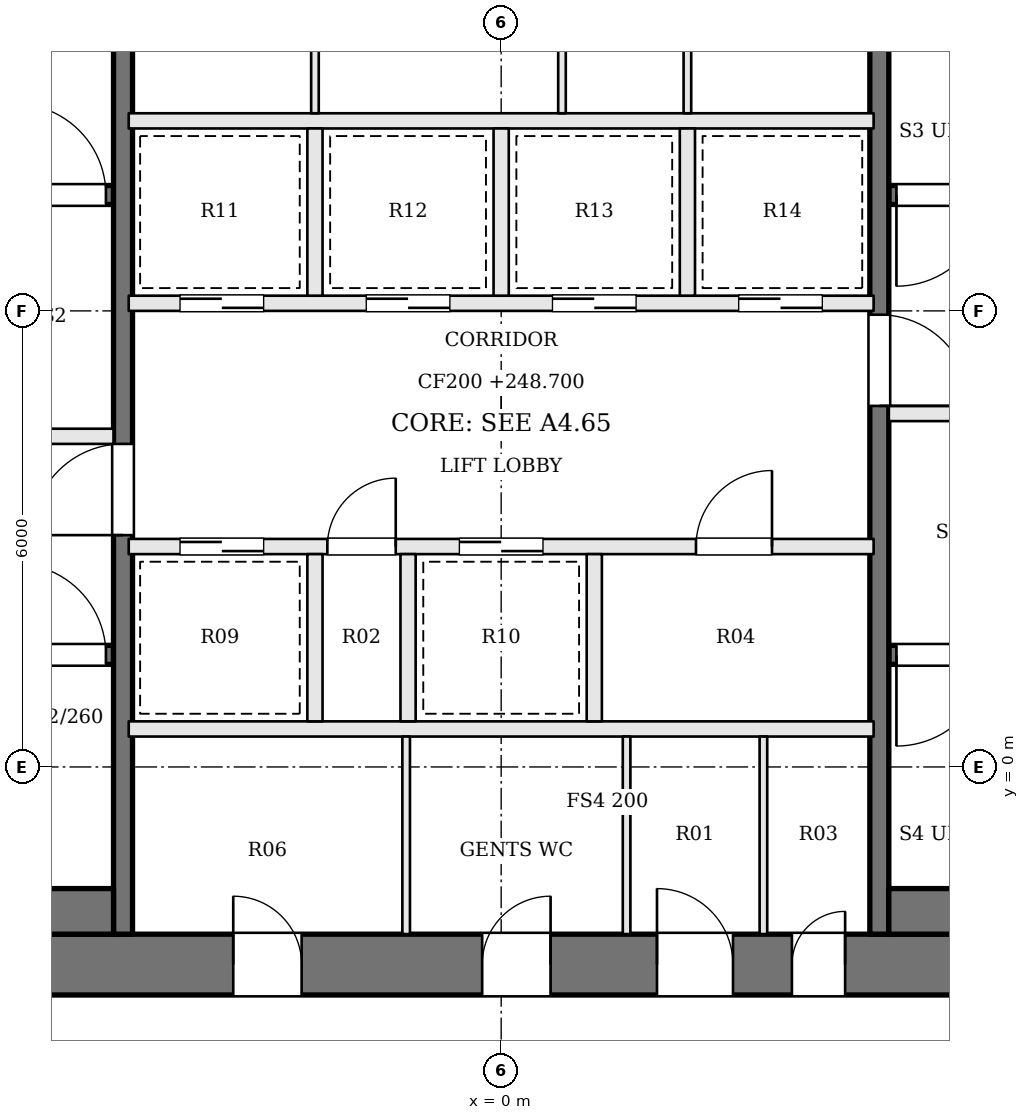
"""IFC4 building model, lengths in metres.
Left out: names, types, materials, properties, quantities, classifications, styles, units other than length and angle.
Written with IfcOpenShell. Run it as: python <this file> out.ifc"""

import sys

from ifc_helpers import new_model, si_unit, direction, frame, frame_2d, origin, place, context, subcontext, project, spatial, rectangle, extrude, element, fill, save


model = new_model("IFC4")
c1 = context("Model", 3, precision=1e-05, world=origin(), true_north=direction((0.0, 1.0)))
c2 = subcontext(c1, "Body", "Model", "MODEL_VIEW")
j1 = project(units=[si_unit("LENGTHUNIT", "METRE"), si_unit("PLANEANGLEUNIT", "RADIAN")], contexts=[c1])
p1 = place(None, origin())
s1 = spatial("IfcSite", under=j1, at=p1, CompositionType="ELEMENT")
p2 = place(p1, origin())
s2 = spatial("IfcBuilding", under=s1, at=p2, CompositionType="ELEMENT")
p3 = place(p2, frame((0.0, 0.0, 248.7)))
s3 = spatial("IfcBuildingStorey", under=s2, at=p3, CompositionType="ELEMENT", Elevation=248.7)
p4 = place(p3, frame((-13.0, -2.6, 0.0), z_axis=(0.0, 0.0, 1.0), x_axis=(1.0, 0.0, 0.0)))
e1 = element("IfcWall", 1, at=p4, inside=s3, PredefinedType="SHEAR", context=c2, shape_type="SweptSolid", body=[
    extrude(rectangle(XDim=26.0, YDim=0.8, at=frame_2d((13.0, 0.0))), origin(), (0.0, 0.0, 1.0), 3.9),
])
p5 = place(p4, frame((9.475, 0.0, 0.0)))
e2 = element("IfcOpeningElement", 2, at=p5, cuts=e1, PredefinedType="OPENING", context=c2, shape_type="SweptSolid", body=[
    extrude(rectangle(XDim=0.9, YDim=2.1, at=frame_2d((0.45, 1.05))), frame((0.0, 0.41, 0.0), z_axis=(0.0, -1.0, 0.0), x_axis=(1.0, 0.0, 0.0)), (0.0, 0.0, 1.0), 0.82),
])
p6 = place(p4, frame((12.75, 0.0, 0.0)))
e3 = element("IfcOpeningElement", 3, at=p6, cuts=e1, PredefinedType="OPENING", context=c2, shape_type="SweptSolid", body=[
    extrude(rectangle(XDim=0.9, YDim=2.1, at=frame_2d((0.45, 1.05))), frame((0.0, 0.41, 0.0), z_axis=(0.0, -1.0, 0.0), x_axis=(1.0, 0.0, 0.0)), (0.0, 0.0, 1.0), 0.82),
])
p7 = place(p4, frame((15.05, 0.0, 0.0)))
e4 = element("IfcOpeningElement", 4, at=p7, cuts=e1, PredefinedType="OPENING", context=c2, shape_type="SweptSolid", body=[
    extrude(rectangle(XDim=1.0, YDim=2.1, at=frame_2d((0.5, 1.05))), frame((0.0, 0.41, 0.0), z_axis=(0.0, -1.0, 0.0), x_axis=(1.0, 0.0, 0.0)), (0.0, 0.0, 1.0), 0.82),
])
p8 = place(p4, frame((16.825, 0.0, 0.0)))
e5 = element("IfcOpeningElement", 5, at=p8, cuts=e1, PredefinedType="OPENING", context=c2, shape_type="SweptSolid", body=[
    extrude(rectangle(XDim=0.7, YDim=2.1, at=frame_2d((0.35, 1.05))), frame((0.0, 0.41, 0.0), z_axis=(0.0, -1.0, 0.0), x_axis=(1.0, 0.0, 0.0)), (0.0, 0.0, 1.0), 0.82),
])
p9 = place(p3, frame((-12.2, 1.475, 0.0), z_axis=(0.0, 0.0, 1.0), x_axis=(1.0, 0.0, 0.0)))
e6 = element("IfcWall", 6, at=p9, inside=s3, PredefinedType="SOLIDWALL", context=c2, shape_type="SweptSolid", body=[
    extrude(rectangle(XDim=7.1, YDim=0.25, at=frame_2d((3.55, 0.0))), origin(), (0.0, 0.0, 1.0), 3.7),
])
p10 = place(p9, frame((5.8, 0.0, 0.0)))
e7 = element("IfcOpeningElement", 7, at=p10, cuts=e6, PredefinedType="OPENING", context=c2, shape_type="SweptSolid", body=[
    extrude(rectangle(XDim=1.2, YDim=2.1, at=frame_2d((0.6, 1.05))), frame((0.0, 0.135, 0.0), z_axis=(0.0, -1.0, 0.0), x_axis=(1.0, 0.0, 0.0)), (0.0, 0.0, 1.0), 0.27),
])
p11 = place(p3, frame((12.2, 7.525, 0.0), z_axis=(0.0, 0.0, 1.0), x_axis=(-1.0, 0.0, 0.0)))
e8 = element("IfcWall", 8, at=p11, inside=s3, PredefinedType="SOLIDWALL", context=c2, shape_type="SweptSolid", body=[
    extrude(rectangle(XDim=7.1, YDim=0.25, at=frame_2d((3.55, 0.0))), origin(), (0.0, 0.0, 1.0), 3.7),
])
p12 = place(p11, frame((5.8, 0.0, 0.0)))
e9 = element("IfcOpeningElement", 9, at=p12, cuts=e8, PredefinedType="OPENING", context=c2, shape_type="SweptSolid", body=[
    extrude(rectangle(XDim=1.2, YDim=2.1, at=frame_2d((0.6, 1.05))), frame((0.0, 0.135, 0.0), z_axis=(0.0, -1.0, 0.0), x_axis=(1.0, 0.0, 0.0)), (0.0, 0.0, 1.0), 0.27),
])
p13 = place(p3, frame((-12.2, 4.35, 0.0), z_axis=(0.0, 0.0, 1.0), x_axis=(1.0, 0.0, 0.0)))
e10 = element("IfcWall", 10, at=p13, inside=s3, PredefinedType="SOLIDWALL", context=c2, shape_type="SweptSolid", body=[
    extrude(rectangle(XDim=7.1, YDim=0.2, at=frame_2d((3.55, 0.0))), origin(), (0.0, 0.0, 1.0), 3.7),
])
p14 = place(p13, frame((4.4, 0.0, 0.0)))
e11 = element("IfcOpeningElement", 11, at=p14, cuts=e10, PredefinedType="OPENING", context=c2, shape_type="SweptSolid", body=[
    extrude(rectangle(XDim=1.2, YDim=2.1, at=frame_2d((0.6, 1.05))), frame((0.0, 0.11, 0.0), z_axis=(0.0, -1.0, 0.0), x_axis=(1.0, 0.0, 0.0)), (0.0, 0.0, 1.0), 0.22),
])
p15 = place(p13, frame((1.1, 0.0, 0.0)))
e12 = element("IfcOpeningElement", 12, at=p15, cuts=e10, PredefinedType="OPENING", context=c2, shape_type="SweptSolid", body=[
    extrude(rectangle(XDim=1.2, YDim=2.1, at=frame_2d((0.6, 1.05))), frame((0.0, 0.11, 0.0), z_axis=(0.0, -1.0, 0.0), x_axis=(1.0, 0.0, 0.0)), (0.0, 0.0, 1.0), 0.22),
])
p16 = place(p3, frame((12.2, 4.65, 0.0), z_axis=(0.0, 0.0, 1.0), x_axis=(-1.0, 0.0, 0.0)))
e13 = element("IfcWall", 13, at=p16, inside=s3, PredefinedType="SOLIDWALL", context=c2, shape_type="SweptSolid", body=[
    extrude(rectangle(XDim=7.1, YDim=0.2, at=frame_2d((3.55, 0.0))), origin(), (0.0, 0.0, 1.0), 3.7),
])
p17 = place(p16, frame((4.4, 0.0, 0.0)))
e14 = element("IfcOpeningElement", 14, at=p17, cuts=e13, PredefinedType="OPENING", context=c2, shape_type="SweptSolid", body=[
    extrude(rectangle(XDim=1.2, YDim=2.1, at=frame_2d((0.6, 1.05))), frame((0.0, 0.11, 0.0), z_axis=(0.0, -1.0, 0.0), x_axis=(1.0, 0.0, 0.0)), (0.0, 0.0, 1.0), 0.22),
])
p18 = place(p16, frame((1.1, 0.0, 0.0)))
e15 = element("IfcOpeningElement", 15, at=p18, cuts=e13, PredefinedType="OPENING", context=c2, shape_type="SweptSolid", body=[
    extrude(rectangle(XDim=1.2, YDim=2.1, at=frame_2d((0.6, 1.05))), frame((0.0, 0.11, 0.0), z_axis=(0.0, -1.0, 0.0), x_axis=(1.0, 0.0, 0.0)), (0.0, 0.0, 1.0), 0.22),
])
p19 = place(p3, frame((-12.2, 7.525, 0.0), z_axis=(0.0, 0.0, 1.0), x_axis=(1.0, 0.0, 0.0)))
e16 = element("IfcWall", 16, at=p19, inside=s3, PredefinedType="SOLIDWALL", context=c2, shape_type="SweptSolid", body=[
    extrude(rectangle(XDim=7.1, YDim=0.25, at=frame_2d((3.55, 0.0))), origin(), (0.0, 0.0, 1.0), 3.7),
])
p20 = place(p19, frame((5.8, 0.0, 0.0)))
e17 = element("IfcOpeningElement", 17, at=p20, cuts=e16, PredefinedType="OPENING", context=c2, shape_type="SweptSolid", body=[
    extrude(rectangle(XDim=1.2, YDim=2.1, at=frame_2d((0.6, 1.05))), frame((0.0, 0.135, 0.0), z_axis=(0.0, -1.0, 0.0), x_axis=(1.0, 0.0, 0.0)), (0.0, 0.0, 1.0), 0.27),
])
p21 = place(p3, frame((12.2, 1.475, 0.0), z_axis=(0.0, 0.0, 1.0), x_axis=(-1.0, 0.0, 0.0)))
e18 = element("IfcWall", 18, at=p21, inside=s3, PredefinedType="SOLIDWALL", context=c2, shape_type="SweptSolid", body=[
    extrude(rectangle(XDim=7.1, YDim=0.25, at=frame_2d((3.55, 0.0))), origin(), (0.0, 0.0, 1.0), 3.7),
])
p22 = place(p21, frame((5.8, 0.0, 0.0)))
e19 = element("IfcOpeningElement", 19, at=p22, cuts=e18, PredefinedType="OPENING", context=c2, shape_type="SweptSolid", body=[
    extrude(rectangle(XDim=1.2, YDim=2.1, at=frame_2d((0.6, 1.05))), frame((0.0, 0.135, 0.0), z_axis=(0.0, -1.0, 0.0), x_axis=(1.0, 0.0, 0.0)), (0.0, 0.0, 1.0), 0.27),
])
p23 = place(p3, frame((-4.975, -2.2, 0.0), z_axis=(0.0, 0.0, 1.0), x_axis=(0.0, 1.0, 0.0)))
e20 = element("IfcWall", 20, at=p23, inside=s3, PredefinedType="SOLIDWALL", context=c2, shape_type="SweptSolid", body=[
    extrude(rectangle(XDim=13.4, YDim=0.25, at=frame_2d((6.7, 0.0))), origin(), (0.0, 0.0, 1.0), 3.7),
])
p24 = place(p23, frame((5.25, 0.0, 0.0)))
e21 = element("IfcOpeningElement", 21, at=p24, cuts=e20, PredefinedType="OPENING", context=c2, shape_type="SweptSolid", body=[
    extrude(rectangle(XDim=1.2, YDim=2.1, at=frame_2d((0.6, 1.05))), frame((0.0, 0.135, 0.0), z_axis=(0.0, -1.0, 0.0), x_axis=(1.0, 0.0, 0.0)), (0.0, 0.0, 1.0), 0.27),
])
p25 = place(p3, frame((4.975, 11.2, 0.0), z_axis=(0.0, 0.0, 1.0), x_axis=(0.0, -1.0, 0.0)))
e22 = element("IfcWall", 22, at=p25, inside=s3, PredefinedType="SOLIDWALL", context=c2, shape_type="SweptSolid", body=[
    extrude(rectangle(XDim=13.4, YDim=0.25, at=frame_2d((6.7, 0.0))), origin(), (0.0, 0.0, 1.0), 3.7),
])
p26 = place(p25, frame((5.25, 0.0, 0.0)))
e23 = element("IfcOpeningElement", 23, at=p26, cuts=e22, PredefinedType="OPENING", context=c2, shape_type="SweptSolid", body=[
    extrude(rectangle(XDim=1.2, YDim=2.1, at=frame_2d((0.6, 1.05))), frame((0.0, 0.135, 0.0), z_axis=(0.0, -1.0, 0.0), x_axis=(1.0, 0.0, 0.0)), (0.0, 0.0, 1.0), 0.27),
])
for number, where, z_axis, x_axis in (
    (24, (-12.2, -1.9, 0.0), (0.0, 0.0, 1.0), (1.0, 0.0, 0.0)),
    (25, (12.2, -1.9, 0.0), (0.0, 0.0, 1.0), (-1.0, 0.0, 0.0)),
):
    element("IfcWall", number, at=place(p3, frame(where, z_axis=z_axis, x_axis=x_axis)), inside=s3, PredefinedType="SOLIDWALL", context=c2, shape_type="SweptSolid", body=[
        extrude(rectangle(XDim=7.1, YDim=0.6, at=frame_2d((3.55, 0.0))), origin(), (0.0, 0.0, 1.0), 3.7),
    ])
p27 = place(p3, frame((-4.9, 0.5, 0.0), z_axis=(0.0, 0.0, 1.0), x_axis=(1.0, 0.0, 0.0)))
e26 = element("IfcWall", 26, at=p27, inside=s3, PredefinedType="SOLIDWALL", context=c2, shape_type="SweptSolid", body=[
    extrude(rectangle(XDim=9.8, YDim=0.2, at=frame_2d((4.9, 0.0))), origin(), (0.0, 0.0, 1.0), 3.7),
])
p28 = place(p3, frame((-4.9, 2.9, 0.0), z_axis=(0.0, 0.0, 1.0), x_axis=(1.0, 0.0, 0.0)))
e27 = element("IfcWall", 27, at=p28, inside=s3, PredefinedType="SOLIDWALL", context=c2, shape_type="SweptSolid", body=[
    extrude(rectangle(XDim=9.8, YDim=0.2, at=frame_2d((4.9, 0.0))), origin(), (0.0, 0.0, 1.0), 3.7),
])
p29 = place(p28, frame((0.675, 0.0, 0.0)))
e28 = element("IfcOpeningElement", 28, at=p29, cuts=e27, PredefinedType="OPENING", context=c2, shape_type="SweptSolid", body=[
    extrude(rectangle(XDim=1.1, YDim=2.1, at=frame_2d((0.55, 1.05))), frame((0.0, 0.11, 0.0), z_axis=(0.0, -1.0, 0.0), x_axis=(1.0, 0.0, 0.0)), (0.0, 0.0, 1.0), 0.22),
])
p30 = place(p28, frame((2.613, 0.0, 0.0)))
e29 = element("IfcOpeningElement", 29, at=p30, cuts=e27, PredefinedType="OPENING", context=c2, shape_type="SweptSolid", body=[
    extrude(rectangle(XDim=0.9, YDim=2.1, at=frame_2d((0.45, 1.05))), frame((0.0, 0.11, 0.0), z_axis=(0.0, -1.0, 0.0), x_axis=(1.0, 0.0, 0.0)), (0.0, 0.0, 1.0), 0.22),
])
p31 = place(p28, frame((4.35, 0.0, 0.0)))
e30 = element("IfcOpeningElement", 30, at=p31, cuts=e27, PredefinedType="OPENING", context=c2, shape_type="SweptSolid", body=[
    extrude(rectangle(XDim=1.1, YDim=2.1, at=frame_2d((0.55, 1.05))), frame((0.0, 0.11, 0.0), z_axis=(0.0, -1.0, 0.0), x_axis=(1.0, 0.0, 0.0)), (0.0, 0.0, 1.0), 0.22),
])
p32 = place(p28, frame((7.463, 0.0, 0.0)))
e31 = element("IfcOpeningElement", 31, at=p32, cuts=e27, PredefinedType="OPENING", context=c2, shape_type="SweptSolid", body=[
    extrude(rectangle(XDim=1.0, YDim=2.1, at=frame_2d((0.5, 1.05))), frame((0.0, 0.11, 0.0), z_axis=(0.0, -1.0, 0.0), x_axis=(1.0, 0.0, 0.0)), (0.0, 0.0, 1.0), 0.22),
])
p33 = place(p3, frame((-4.9, 6.1, 0.0), z_axis=(0.0, 0.0, 1.0), x_axis=(1.0, 0.0, 0.0)))
e32 = element("IfcWall", 32, at=p33, inside=s3, PredefinedType="SOLIDWALL", context=c2, shape_type="SweptSolid", body=[
    extrude(rectangle(XDim=9.8, YDim=0.2, at=frame_2d((4.9, 0.0))), origin(), (0.0, 0.0, 1.0), 3.7),
])
p34 = place(p33, frame((0.675, 0.0, 0.0)))
e33 = element("IfcOpeningElement", 33, at=p34, cuts=e32, PredefinedType="OPENING", context=c2, shape_type="SweptSolid", body=[
    extrude(rectangle(XDim=1.1, YDim=2.1, at=frame_2d((0.55, 1.05))), frame((0.0, 0.11, 0.0), z_axis=(0.0, -1.0, 0.0), x_axis=(1.0, 0.0, 0.0)), (0.0, 0.0, 1.0), 0.22),
])
p35 = place(p33, frame((3.125, 0.0, 0.0)))
e34 = element("IfcOpeningElement", 34, at=p35, cuts=e32, PredefinedType="OPENING", context=c2, shape_type="SweptSolid", body=[
    extrude(rectangle(XDim=1.1, YDim=2.1, at=frame_2d((0.55, 1.05))), frame((0.0, 0.11, 0.0), z_axis=(0.0, -1.0, 0.0), x_axis=(1.0, 0.0, 0.0)), (0.0, 0.0, 1.0), 0.22),
])
p36 = place(p33, frame((5.575, 0.0, 0.0)))
e35 = element("IfcOpeningElement", 35, at=p36, cuts=e32, PredefinedType="OPENING", context=c2, shape_type="SweptSolid", body=[
    extrude(rectangle(XDim=1.1, YDim=2.1, at=frame_2d((0.55, 1.05))), frame((0.0, 0.11, 0.0), z_axis=(0.0, -1.0, 0.0), x_axis=(1.0, 0.0, 0.0)), (0.0, 0.0, 1.0), 0.22),
])
p37 = place(p33, frame((8.025, 0.0, 0.0)))
e36 = element("IfcOpeningElement", 36, at=p37, cuts=e32, PredefinedType="OPENING", context=c2, shape_type="SweptSolid", body=[
    extrude(rectangle(XDim=1.1, YDim=2.1, at=frame_2d((0.55, 1.05))), frame((0.0, 0.11, 0.0), z_axis=(0.0, -1.0, 0.0), x_axis=(1.0, 0.0, 0.0)), (0.0, 0.0, 1.0), 0.22),
])
p38 = place(p3, frame((-4.9, 8.5, 0.0), z_axis=(0.0, 0.0, 1.0), x_axis=(1.0, 0.0, 0.0)))
e37 = element("IfcWall", 37, at=p38, inside=s3, PredefinedType="SOLIDWALL", context=c2, shape_type="SweptSolid", body=[
    extrude(rectangle(XDim=9.8, YDim=0.2, at=frame_2d((4.9, 0.0))), origin(), (0.0, 0.0, 1.0), 3.7),
])
for number, where, z_axis, x_axis in (
    (38, (-2.45, 0.6, 0.0), (0.0, 0.0, 1.0), (0.0, 1.0, 0.0)),
    (39, (-1.225, 0.6, 0.0), (0.0, 0.0, 1.0), (0.0, 1.0, 0.0)),
    (40, (1.225, 0.6, 0.0), (0.0, 0.0, 1.0), (0.0, 1.0, 0.0)),
    (41, (-2.45, 6.2, 0.0), (0.0, 0.0, 1.0), (0.0, 1.0, 0.0)),
    (42, (0.0, 6.2, 0.0), (0.0, 0.0, 1.0), (0.0, 1.0, 0.0)),
    (43, (2.45, 6.2, 0.0), (0.0, 0.0, 1.0), (0.0, 1.0, 0.0)),
):
    element("IfcWall", number, at=place(p3, frame(where, z_axis=z_axis, x_axis=x_axis)), inside=s3, PredefinedType="SOLIDWALL", context=c2, shape_type="SweptSolid", body=[
        extrude(rectangle(XDim=2.2, YDim=0.2, at=frame_2d((1.1, 0.0))), origin(), (0.0, 0.0, 1.0), 3.7),
    ])
for number, where, z_axis, x_axis in (
    (44, (-1.25, -2.2, 0.0), (0.0, 0.0, 1.0), (0.0, 1.0, 0.0)),
    (45, (1.65, -2.2, 0.0), (0.0, 0.0, 1.0), (0.0, 1.0, 0.0)),
    (46, (3.45, -2.2, 0.0), (0.0, 0.0, 1.0), (0.0, 1.0, 0.0)),
    (47, (-2.45, 8.6, 0.0), (0.0, 0.0, 1.0), (0.0, 1.0, 0.0)),
    (48, (0.8, 8.6, 0.0), (0.0, 0.0, 1.0), (0.0, 1.0, 0.0)),
    (49, (2.45, 8.6, 0.0), (0.0, 0.0, 1.0), (0.0, 1.0, 0.0)),
):
    element("IfcWall", number, at=place(p3, frame(where, z_axis=z_axis, x_axis=x_axis)), inside=s3, PredefinedType="PARTITIONING", context=c2, shape_type="SweptSolid", body=[
        extrude(rectangle(XDim=2.6, YDim=0.1, at=frame_2d((1.3, 0.0))), origin(), (0.0, 0.0, 1.0), 3.7),
    ])
p39 = place(p24, origin())
e50 = element("IfcDoor", 50, at=p39, inside=s3, OperationType="SINGLE_SWING_LEFT", PredefinedType="DOOR", context=c2, shape_type="SweptSolid", body=[
    extrude(rectangle(XDim=1.2, YDim=2.1, at=frame_2d((0.6, 1.05))), frame((0.0, 0.025, 0.0), z_axis=(0.0, -1.0, 0.0), x_axis=(1.0, 0.0, 0.0)), (0.0, 0.0, 1.0), 0.05),
])
fill(e21, e50)
p40 = place(p26, origin())
e51 = element("IfcDoor", 51, at=p40, inside=s3, OperationType="SINGLE_SWING_RIGHT", PredefinedType="DOOR", context=c2, shape_type="SweptSolid", body=[
    extrude(rectangle(XDim=1.2, YDim=2.1, at=frame_2d((0.6, 1.05))), frame((0.0, 0.025, 0.0), z_axis=(0.0, -1.0, 0.0), x_axis=(1.0, 0.0, 0.0)), (0.0, 0.0, 1.0), 0.05),
])
fill(e23, e51)
p41 = place(p10, origin())
e52 = element("IfcDoor", 52, at=p41, inside=s3, OperationType="SINGLE_SWING_LEFT", PredefinedType="DOOR", context=c2, shape_type="SweptSolid", body=[
    extrude(rectangle(XDim=1.2, YDim=2.1, at=frame_2d((0.6, 1.05))), frame((0.0, 0.025, 0.0), z_axis=(0.0, -1.0, 0.0), x_axis=(1.0, 0.0, 0.0)), (0.0, 0.0, 1.0), 0.05),
])
fill(e7, e52)
p42 = place(p12, origin())
e53 = element("IfcDoor", 53, at=p42, inside=s3, OperationType="SINGLE_SWING_RIGHT", PredefinedType="DOOR", context=c2, shape_type="SweptSolid", body=[
    extrude(rectangle(XDim=1.2, YDim=2.1, at=frame_2d((0.6, 1.05))), frame((0.0, 0.025, 0.0), z_axis=(0.0, -1.0, 0.0), x_axis=(1.0, 0.0, 0.0)), (0.0, 0.0, 1.0), 0.05),
])
fill(e9, e53)
p43 = place(p20, origin())
e54 = element("IfcDoor", 54, at=p43, inside=s3, OperationType="SINGLE_SWING_LEFT", PredefinedType="DOOR", context=c2, shape_type="SweptSolid", body=[
    extrude(rectangle(XDim=1.2, YDim=2.1, at=frame_2d((0.6, 1.05))), frame((0.0, 0.025, 0.0), z_axis=(0.0, -1.0, 0.0), x_axis=(1.0, 0.0, 0.0)), (0.0, 0.0, 1.0), 0.05),
])
fill(e17, e54)
p44 = place(p22, origin())
e55 = element("IfcDoor", 55, at=p44, inside=s3, OperationType="SINGLE_SWING_RIGHT", PredefinedType="DOOR", context=c2, shape_type="SweptSolid", body=[
    extrude(rectangle(XDim=1.2, YDim=2.1, at=frame_2d((0.6, 1.05))), frame((0.0, 0.025, 0.0), z_axis=(0.0, -1.0, 0.0), x_axis=(1.0, 0.0, 0.0)), (0.0, 0.0, 1.0), 0.05),
])
fill(e19, e55)
p45 = place(p29, origin())
e56 = element("IfcDoor", 56, at=p45, inside=s3, OperationType="SLIDING_TO_RIGHT", PredefinedType="DOOR", context=c2, shape_type="SweptSolid", body=[
    extrude(rectangle(XDim=1.1, YDim=2.1, at=frame_2d((0.55, 1.05))), frame((0.0, 0.025, 0.0), z_axis=(0.0, -1.0, 0.0), x_axis=(1.0, 0.0, 0.0)), (0.0, 0.0, 1.0), 0.05),
])
fill(e28, e56)
p46 = place(p30, origin())
e57 = element("IfcDoor", 57, at=p46, inside=s3, OperationType="SINGLE_SWING_RIGHT", PredefinedType="DOOR", context=c2, shape_type="SweptSolid", body=[
    extrude(rectangle(XDim=0.9, YDim=2.1, at=frame_2d((0.45, 1.05))), frame((0.0, 0.025, 0.0), z_axis=(0.0, -1.0, 0.0), x_axis=(1.0, 0.0, 0.0)), (0.0, 0.0, 1.0), 0.05),
])
fill(e29, e57)
p47 = place(p31, origin())
e58 = element("IfcDoor", 58, at=p47, inside=s3, OperationType="SLIDING_TO_LEFT", PredefinedType="DOOR", context=c2, shape_type="SweptSolid", body=[
    extrude(rectangle(XDim=1.1, YDim=2.1, at=frame_2d((0.55, 1.05))), frame((0.0, 0.025, 0.0), z_axis=(0.0, -1.0, 0.0), x_axis=(1.0, 0.0, 0.0)), (0.0, 0.0, 1.0), 0.05),
])
fill(e30, e58)
p48 = place(p32, origin())
e59 = element("IfcDoor", 59, at=p48, inside=s3, OperationType="SINGLE_SWING_RIGHT", PredefinedType="DOOR", context=c2, shape_type="SweptSolid", body=[
    extrude(rectangle(XDim=1.0, YDim=2.1, at=frame_2d((0.5, 1.05))), frame((0.0, 0.025, 0.0), z_axis=(0.0, -1.0, 0.0), x_axis=(1.0, 0.0, 0.0)), (0.0, 0.0, 1.0), 0.05),
])
fill(e31, e59)
p49 = place(p34, origin())
e60 = element("IfcDoor", 60, at=p49, inside=s3, OperationType="SLIDING_TO_RIGHT", PredefinedType="DOOR", context=c2, shape_type="SweptSolid", body=[
    extrude(rectangle(XDim=1.1, YDim=2.1, at=frame_2d((0.55, 1.05))), frame((0.0, 0.025, 0.0), z_axis=(0.0, -1.0, 0.0), x_axis=(1.0, 0.0, 0.0)), (0.0, 0.0, 1.0), 0.05),
])
fill(e33, e60)
p50 = place(p35, origin())
e61 = element("IfcDoor", 61, at=p50, inside=s3, OperationType="SLIDING_TO_LEFT", PredefinedType="DOOR", context=c2, shape_type="SweptSolid", body=[
    extrude(rectangle(XDim=1.1, YDim=2.1, at=frame_2d((0.55, 1.05))), frame((0.0, 0.025, 0.0), z_axis=(0.0, -1.0, 0.0), x_axis=(1.0, 0.0, 0.0)), (0.0, 0.0, 1.0), 0.05),
])
fill(e34, e61)
p51 = place(p36, origin())
e62 = element("IfcDoor", 62, at=p51, inside=s3, OperationType="SLIDING_TO_RIGHT", PredefinedType="DOOR", context=c2, shape_type="SweptSolid", body=[
    extrude(rectangle(XDim=1.1, YDim=2.1, at=frame_2d((0.55, 1.05))), frame((0.0, 0.025, 0.0), z_axis=(0.0, -1.0, 0.0), x_axis=(1.0, 0.0, 0.0)), (0.0, 0.0, 1.0), 0.05),
])
fill(e35, e62)
p52 = place(p37, origin())
e63 = element("IfcDoor", 63, at=p52, inside=s3, OperationType="SLIDING_TO_LEFT", PredefinedType="DOOR", context=c2, shape_type="SweptSolid", body=[
    extrude(rectangle(XDim=1.1, YDim=2.1, at=frame_2d((0.55, 1.05))), frame((0.0, 0.025, 0.0), z_axis=(0.0, -1.0, 0.0), x_axis=(1.0, 0.0, 0.0)), (0.0, 0.0, 1.0), 0.05),
])
fill(e36, e63)
p53 = place(p5, origin())
e64 = element("IfcDoor", 64, at=p53, inside=s3, OperationType="SINGLE_SWING_LEFT", PredefinedType="DOOR", context=c2, shape_type="SweptSolid", body=[
    extrude(rectangle(XDim=0.9, YDim=2.1, at=frame_2d((0.45, 1.05))), frame((0.0, 0.025, 0.0), z_axis=(0.0, -1.0, 0.0), x_axis=(1.0, 0.0, 0.0)), (0.0, 0.0, 1.0), 0.05),
])
fill(e2, e64)
p54 = place(p6, origin())
e65 = element("IfcDoor", 65, at=p54, inside=s3, OperationType="SINGLE_SWING_RIGHT", PredefinedType="DOOR", context=c2, shape_type="SweptSolid", body=[
    extrude(rectangle(XDim=0.9, YDim=2.1, at=frame_2d((0.45, 1.05))), frame((0.0, 0.025, 0.0), z_axis=(0.0, -1.0, 0.0), x_axis=(1.0, 0.0, 0.0)), (0.0, 0.0, 1.0), 0.05),
])
fill(e3, e65)
p55 = place(p7, origin())
e66 = element("IfcDoor", 66, at=p55, inside=s3, OperationType="SINGLE_SWING_LEFT", PredefinedType="DOOR", context=c2, shape_type="SweptSolid", body=[
    extrude(rectangle(XDim=1.0, YDim=2.1, at=frame_2d((0.5, 1.05))), frame((0.0, 0.025, 0.0), z_axis=(0.0, -1.0, 0.0), x_axis=(1.0, 0.0, 0.0)), (0.0, 0.0, 1.0), 0.05),
])
fill(e4, e66)
p56 = place(p8, origin())
e67 = element("IfcDoor", 67, at=p56, inside=s3, OperationType="SINGLE_SWING_RIGHT", PredefinedType="DOOR", context=c2, shape_type="SweptSolid", body=[
    extrude(rectangle(XDim=0.7, YDim=2.1, at=frame_2d((0.35, 1.05))), frame((0.0, 0.025, 0.0), z_axis=(0.0, -1.0, 0.0), x_axis=(1.0, 0.0, 0.0)), (0.0, 0.0, 1.0), 0.05),
])
fill(e5, e67)
save(model, sys.argv[1])
